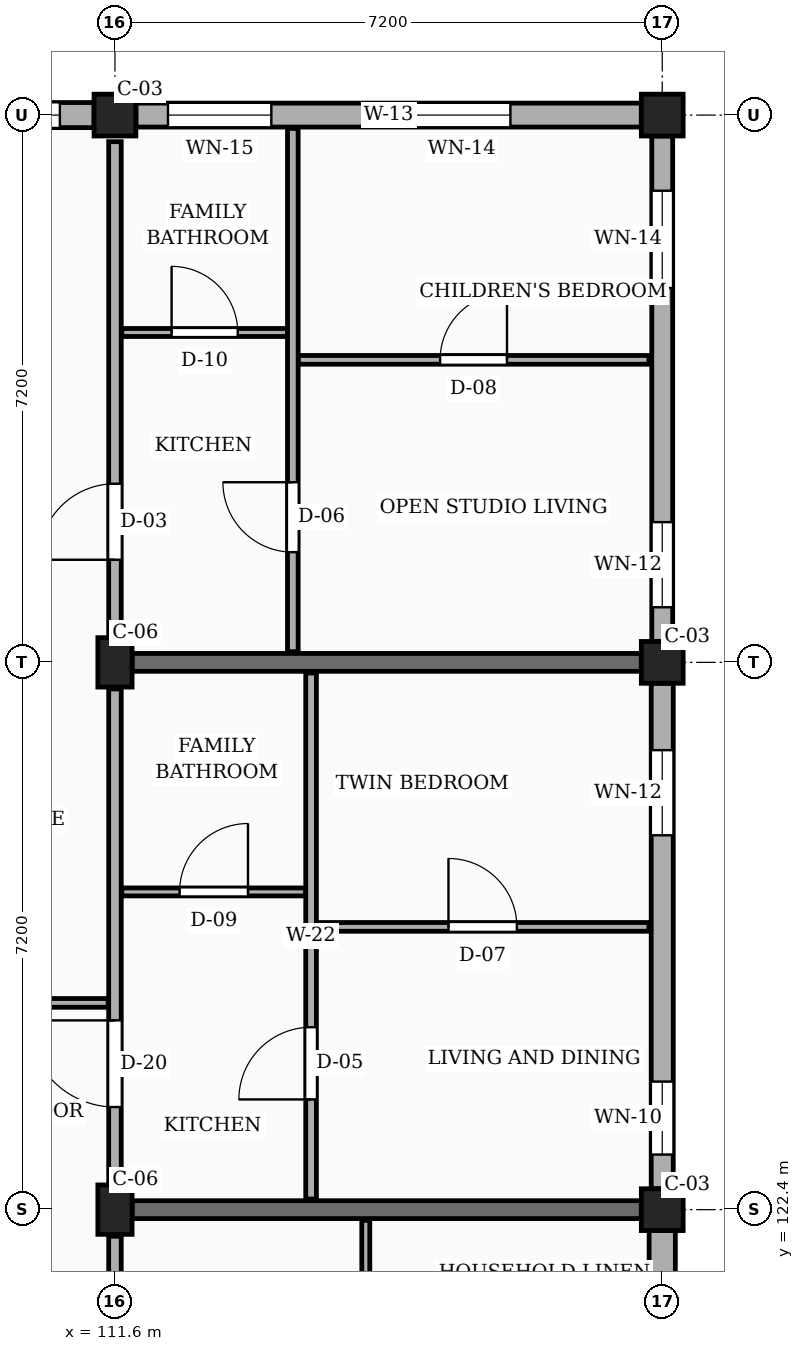
"""IFC4 building model, lengths in metres.
Left out: names, types, materials, properties, quantities, classifications, styles, units other than length and angle.
Written with IfcOpenShell. Run it as: python <this file> out.ifc"""

import sys

from ifc_helpers import new_model, si_unit, direction, frame, frame_2d, origin, origin_2d, place, context, subcontext, project, spatial, rectangle, extrude, element, fill, save


model = new_model("IFC4")
c1 = context("Model", 3, precision=1e-05, world=origin(), true_north=direction((0.0, 1.0)))
c2 = subcontext(c1, "Body", "Model", "MODEL_VIEW")
j1 = project(units=[si_unit("LENGTHUNIT", "METRE"), si_unit("PLANEANGLEUNIT", "RADIAN")], contexts=[c1])
p1 = place(None, origin())
s1 = spatial("IfcSite", under=j1, at=p1, CompositionType="ELEMENT")
p2 = place(p1, origin())
s2 = spatial("IfcBuilding", under=s1, at=p2, CompositionType="ELEMENT")
p3 = place(p2, frame((0.0, 0.0, 17.1)))
s3 = spatial("IfcBuildingStorey", under=s2, at=p3, CompositionType="ELEMENT", Elevation=17.1)
for number, where, z_axis, x_axis in (
    (1, (111.6, 122.4, 0.0), (0.0, 0.0, 1.0), (1.0, 0.0, 0.0)),
    (2, (111.6, 129.6, 0.0), (0.0, 0.0, 1.0), (1.0, 0.0, 0.0)),
):
    element("IfcColumn", number, at=place(p3, frame(where, z_axis=z_axis, x_axis=x_axis)), inside=s3, PredefinedType="COLUMN", context=c2, shape_type="SweptSolid", body=[
        extrude(rectangle(XDim=0.45, YDim=0.65, at=origin_2d()), origin(), (0.0, 0.0, 1.0), 3.15),
    ])
for number, where, z_axis, x_axis in (
    (3, (111.6, 136.8, 0.0), (0.0, 0.0, 1.0), (1.0, 0.0, 0.0)),
    (4, (118.8, 122.4, 0.0), (0.0, 0.0, 1.0), (1.0, 0.0, 0.0)),
    (5, (118.8, 129.6, 0.0), (0.0, 0.0, 1.0), (1.0, 0.0, 0.0)),
    (6, (118.8, 136.8, 0.0), (0.0, 0.0, 1.0), (1.0, 0.0, 0.0)),
):
    element("IfcColumn", number, at=place(p3, frame(where, z_axis=z_axis, x_axis=x_axis)), inside=s3, PredefinedType="COLUMN", context=c2, shape_type="SweptSolid", body=[
        extrude(rectangle(XDim=0.55, YDim=0.55, at=origin_2d()), origin(), (0.0, 0.0, 1.0), 3.15),
    ])
for number, where, z_axis, x_axis in (
    (7, (111.825, 122.4, 0.0), (0.0, 0.0, 1.0), (1.0, 0.0, 0.0)),
    (8, (111.825, 129.6, 0.0), (0.0, 0.0, 1.0), (1.0, 0.0, 0.0)),
):
    element("IfcWall", number, at=place(p3, frame(where, z_axis=z_axis, x_axis=x_axis)), inside=s3, PredefinedType="SOLIDWALL", context=c2, shape_type="SweptSolid", body=[
        extrude(rectangle(XDim=6.7, YDim=0.235, at=frame_2d((3.35, 0.0))), origin(), (0.0, 0.0, 1.0), 2.19),
    ])
p4 = place(p3, frame((118.8, 115.475, 0.0), z_axis=(0.0, 0.0, 1.0), x_axis=(0.0, 1.0, 0.0)))
e9 = element("IfcWall", 9, at=p4, inside=s3, PredefinedType="SOLIDWALL", context=c2, shape_type="SweptSolid", body=[
    extrude(rectangle(XDim=6.65, YDim=0.345, at=frame_2d((3.325, 0.0))), origin(), (0.0, 0.0, 1.0), 2.46),
])
p5 = place(p4, frame((0.45, 0.0, 0.78)))
e10 = element("IfcOpeningElement", 10, at=p5, cuts=e9, PredefinedType="OPENING", context=c2, shape_type="SweptSolid", body=[
    extrude(rectangle(XDim=1.4, YDim=1.15, at=frame_2d((0.7, 0.575))), frame((0.0, 0.183, 0.0), z_axis=(0.0, -1.0, 0.0), x_axis=(1.0, 0.0, 0.0)), (0.0, 0.0, 1.0), 0.365),
])
p6 = place(p4, frame((4.65, 0.0, 0.78)))
e11 = element("IfcOpeningElement", 11, at=p6, cuts=e9, PredefinedType="OPENING", context=c2, shape_type="SweptSolid", body=[
    extrude(rectangle(XDim=0.96, YDim=1.26, at=frame_2d((0.48, 0.63))), frame((0.0, 0.183, 0.0), z_axis=(0.0, -1.0, 0.0), x_axis=(1.0, 0.0, 0.0)), (0.0, 0.0, 1.0), 0.365),
])
p7 = place(p3, frame((118.8, 122.675, 0.0), z_axis=(0.0, 0.0, 1.0), x_axis=(0.0, 1.0, 0.0)))
e12 = element("IfcWall", 12, at=p7, inside=s3, PredefinedType="SOLIDWALL", context=c2, shape_type="SweptSolid", body=[
    extrude(rectangle(XDim=6.65, YDim=0.29, at=frame_2d((3.325, 0.0))), origin(), (0.0, 0.0, 1.0), 2.46),
])
p8 = place(p7, frame((0.45, 0.0, 0.78)))
e13 = element("IfcOpeningElement", 13, at=p8, cuts=e12, PredefinedType="OPENING", context=c2, shape_type="SweptSolid", body=[
    extrude(rectangle(XDim=0.96, YDim=1.26, at=frame_2d((0.48, 0.63))), frame((0.0, 0.155, 0.0), z_axis=(0.0, -1.0, 0.0), x_axis=(1.0, 0.0, 0.0)), (0.0, 0.0, 1.0), 0.31),
])
p9 = place(p7, frame((4.65, 0.0, 0.78)))
e14 = element("IfcOpeningElement", 14, at=p9, cuts=e12, PredefinedType="OPENING", context=c2, shape_type="SweptSolid", body=[
    extrude(rectangle(XDim=1.12, YDim=1.26, at=frame_2d((0.56, 0.63))), frame((0.0, 0.155, 0.0), z_axis=(0.0, -1.0, 0.0), x_axis=(1.0, 0.0, 0.0)), (0.0, 0.0, 1.0), 0.31),
])
p10 = place(p3, frame((118.8, 129.875, 0.0), z_axis=(0.0, 0.0, 1.0), x_axis=(0.0, 1.0, 0.0)))
e15 = element("IfcWall", 15, at=p10, inside=s3, PredefinedType="SOLIDWALL", context=c2, shape_type="SweptSolid", body=[
    extrude(rectangle(XDim=6.65, YDim=0.275, at=frame_2d((3.325, 0.0))), origin(), (0.0, 0.0, 1.0), 2.46),
])
p11 = place(p10, frame((0.45, 0.0, 0.78)))
e16 = element("IfcOpeningElement", 16, at=p11, cuts=e15, PredefinedType="OPENING", context=c2, shape_type="SweptSolid", body=[
    extrude(rectangle(XDim=1.12, YDim=1.26, at=frame_2d((0.56, 0.63))), frame((0.0, 0.147, 0.0), z_axis=(0.0, -1.0, 0.0), x_axis=(1.0, 0.0, 0.0)), (0.0, 0.0, 1.0), 0.295),
])
p12 = place(p10, frame((4.65, 0.0, 0.78)))
e17 = element("IfcOpeningElement", 17, at=p12, cuts=e15, PredefinedType="OPENING", context=c2, shape_type="SweptSolid", body=[
    extrude(rectangle(XDim=1.28, YDim=1.26, at=frame_2d((0.64, 0.63))), frame((0.0, 0.147, 0.0), z_axis=(0.0, -1.0, 0.0), x_axis=(1.0, 0.0, 0.0)), (0.0, 0.0, 1.0), 0.295),
])
p13 = place(p3, frame((118.525, 136.8, 0.0), z_axis=(0.0, 0.0, 1.0), x_axis=(-1.0, 0.0, 0.0)))
e18 = element("IfcWall", 18, at=p13, inside=s3, PredefinedType="SOLIDWALL", context=c2, shape_type="SweptSolid", body=[
    extrude(rectangle(XDim=6.65, YDim=0.315, at=frame_2d((3.325, 0.0))), origin(), (0.0, 0.0, 1.0), 2.46),
])
p14 = place(p13, frame((1.722, 0.0, 0.78)))
e19 = element("IfcOpeningElement", 19, at=p14, cuts=e18, PredefinedType="OPENING", context=c2, shape_type="SweptSolid", body=[
    extrude(rectangle(XDim=1.28, YDim=1.26, at=frame_2d((0.64, 0.63))), frame((0.0, 0.167, 0.0), z_axis=(0.0, -1.0, 0.0), x_axis=(1.0, 0.0, 0.0)), (0.0, 0.0, 1.0), 0.335),
])
p15 = place(p13, frame((4.867, 0.0, 0.78)))
e20 = element("IfcOpeningElement", 20, at=p15, cuts=e18, PredefinedType="OPENING", context=c2, shape_type="SweptSolid", body=[
    extrude(rectangle(XDim=1.36, YDim=1.26, at=frame_2d((0.68, 0.63))), frame((0.0, 0.167, 0.0), z_axis=(0.0, -1.0, 0.0), x_axis=(1.0, 0.0, 0.0)), (0.0, 0.0, 1.0), 0.335),
])
p16 = place(p3, frame((111.325, 136.8, 0.0), z_axis=(0.0, 0.0, 1.0), x_axis=(-1.0, 0.0, 0.0)))
e21 = element("IfcWall", 21, at=p16, inside=s3, PredefinedType="SOLIDWALL", context=c2, shape_type="SweptSolid", body=[
    extrude(rectangle(XDim=6.65, YDim=0.33, at=frame_2d((3.325, 0.0))), origin(), (0.0, 0.0, 1.0), 2.46),
])
p17 = place(p16, frame((0.45, 0.0, 0.78)))
e22 = element("IfcOpeningElement", 22, at=p17, cuts=e21, PredefinedType="OPENING", context=c2, shape_type="SweptSolid", body=[
    extrude(rectangle(XDim=1.44, YDim=1.26, at=frame_2d((0.72, 0.63))), frame((0.0, 0.175, 0.0), z_axis=(0.0, -1.0, 0.0), x_axis=(1.0, 0.0, 0.0)), (0.0, 0.0, 1.0), 0.35),
])
p18 = place(p16, frame((4.65, 0.0, 0.78)))
e23 = element("IfcOpeningElement", 23, at=p18, cuts=e21, PredefinedType="OPENING", context=c2, shape_type="SweptSolid", body=[
    extrude(rectangle(XDim=0.98, YDim=1.36, at=frame_2d((0.49, 0.68))), frame((0.0, 0.175, 0.0), z_axis=(0.0, -1.0, 0.0), x_axis=(1.0, 0.0, 0.0)), (0.0, 0.0, 1.0), 0.35),
])
p19 = place(p3, frame((111.6, 115.55, 0.0), z_axis=(0.0, 0.0, 1.0), x_axis=(0.0, 1.0, 0.0)))
e24 = element("IfcWall", 24, at=p19, inside=s3, PredefinedType="PARTITIONING", context=c2, shape_type="SweptSolid", body=[
    extrude(rectangle(XDim=6.5, YDim=0.165, at=frame_2d((3.25, 0.0))), origin(), (0.0, 0.0, 1.0), 2.325),
])
p20 = place(p19, frame((1.1, 0.0, 0.0)))
e25 = element("IfcOpeningElement", 25, at=p20, cuts=e24, PredefinedType="OPENING", context=c2, shape_type="SweptSolid", body=[
    extrude(rectangle(XDim=0.94, YDim=2.12, at=frame_2d((0.47, 1.06))), frame((0.0, 0.093, 0.0), z_axis=(0.0, -1.0, 0.0), x_axis=(1.0, 0.0, 0.0)), (0.0, 0.0, 1.0), 0.185),
])
p21 = place(p3, frame((111.6, 122.75, 0.0), z_axis=(0.0, 0.0, 1.0), x_axis=(0.0, 1.0, 0.0)))
e26 = element("IfcWall", 26, at=p21, inside=s3, PredefinedType="PARTITIONING", context=c2, shape_type="SweptSolid", body=[
    extrude(rectangle(XDim=6.5, YDim=0.165, at=frame_2d((3.25, 0.0))), origin(), (0.0, 0.0, 1.0), 2.325),
])
p22 = place(p21, frame((1.0, 0.0, 0.0)))
e27 = element("IfcOpeningElement", 27, at=p22, cuts=e26, PredefinedType="OPENING", context=c2, shape_type="SweptSolid", body=[
    extrude(rectangle(XDim=1.14, YDim=2.18, at=frame_2d((0.57, 1.09))), frame((0.0, 0.093, 0.0), z_axis=(0.0, -1.0, 0.0), x_axis=(1.0, 0.0, 0.0)), (0.0, 0.0, 1.0), 0.185),
])
p23 = place(p3, frame((111.6, 129.95, 0.0), z_axis=(0.0, 0.0, 1.0), x_axis=(0.0, 1.0, 0.0)))
e28 = element("IfcWall", 28, at=p23, inside=s3, PredefinedType="PARTITIONING", context=c2, shape_type="SweptSolid", body=[
    extrude(rectangle(XDim=6.5, YDim=0.165, at=frame_2d((3.25, 0.0))), origin(), (0.0, 0.0, 1.0), 2.325),
])
p24 = place(p23, frame((1.0, 0.0, 0.0)))
e29 = element("IfcOpeningElement", 29, at=p24, cuts=e28, PredefinedType="OPENING", context=c2, shape_type="SweptSolid", body=[
    extrude(rectangle(XDim=1.0, YDim=2.15, at=frame_2d((0.5, 1.075))), frame((0.0, 0.093, 0.0), z_axis=(0.0, -1.0, 0.0), x_axis=(1.0, 0.0, 0.0)), (0.0, 0.0, 1.0), 0.185),
])
p25 = place(p3, frame((114.9, 119.07, 0.0), z_axis=(0.0, 0.0, 1.0), x_axis=(0.0, 1.0, 0.0)))
e30 = element("IfcWall", 30, at=p25, inside=s3, PredefinedType="PARTITIONING", context=c2, shape_type="SweptSolid", body=[
    extrude(rectangle(XDim=3.19, YDim=0.105, at=frame_2d((1.595, 0.0))), origin(), (0.0, 0.0, 1.0), 2.325),
])
p26 = place(p3, frame((104.49, 125.12, 0.0), z_axis=(0.0, 0.0, 1.0), x_axis=(1.0, 0.0, 0.0)))
e31 = element("IfcWall", 31, at=p26, inside=s3, PredefinedType="PARTITIONING", context=c2, shape_type="SweptSolid", body=[
    extrude(rectangle(XDim=7.02, YDim=0.115, at=frame_2d((3.51, 0.0))), origin(), (0.0, 0.0, 1.0), 2.325),
])
p27 = place(p26, frame((2.85, 0.0, 0.0)))
e32 = element("IfcOpeningElement", 32, at=p27, cuts=e31, PredefinedType="OPENING", context=c2, shape_type="SweptSolid", body=[
    extrude(rectangle(XDim=1.02, YDim=2.15, at=frame_2d((0.51, 1.075))), frame((0.0, 0.067, 0.0), z_axis=(0.0, -1.0, 0.0), x_axis=(1.0, 0.0, 0.0)), (0.0, 0.0, 1.0), 0.135),
])
p28 = place(p3, frame((114.25, 126.12, 0.0), z_axis=(0.0, 0.0, 1.0), x_axis=(1.0, 0.0, 0.0)))
e33 = element("IfcWall", 33, at=p28, inside=s3, PredefinedType="PARTITIONING", context=c2, shape_type="SweptSolid", body=[
    extrude(rectangle(XDim=4.375, YDim=0.115, at=frame_2d((2.188, 0.0))), origin(), (0.0, 0.0, 1.0), 2.325),
])
p29 = place(p28, frame((1.738, 0.0, 0.0)))
e34 = element("IfcOpeningElement", 34, at=p29, cuts=e33, PredefinedType="OPENING", context=c2, shape_type="SweptSolid", body=[
    extrude(rectangle(XDim=0.9, YDim=2.1, at=frame_2d((0.45, 1.05))), frame((0.0, 0.067, 0.0), z_axis=(0.0, -1.0, 0.0), x_axis=(1.0, 0.0, 0.0)), (0.0, 0.0, 1.0), 0.135),
])
p30 = place(p3, frame((111.69, 126.58, 0.0), z_axis=(0.0, 0.0, 1.0), x_axis=(1.0, 0.0, 0.0)))
e35 = element("IfcWall", 35, at=p30, inside=s3, PredefinedType="PARTITIONING", context=c2, shape_type="SweptSolid", body=[
    extrude(rectangle(XDim=2.42, YDim=0.105, at=frame_2d((1.21, 0.0))), origin(), (0.0, 0.0, 1.0), 2.325),
])
p31 = place(p30, frame((0.76, 0.0, 0.0)))
e36 = element("IfcOpeningElement", 36, at=p31, cuts=e35, PredefinedType="OPENING", context=c2, shape_type="SweptSolid", body=[
    extrude(rectangle(XDim=0.9, YDim=2.05, at=frame_2d((0.45, 1.025))), frame((0.0, 0.062, 0.0), z_axis=(0.0, -1.0, 0.0), x_axis=(1.0, 0.0, 0.0)), (0.0, 0.0, 1.0), 0.125),
])
p32 = place(p3, frame((114.18, 122.54, 0.0), z_axis=(0.0, 0.0, 1.0), x_axis=(0.0, 1.0, 0.0)))
e37 = element("IfcWall", 37, at=p32, inside=s3, PredefinedType="PARTITIONING", context=c2, shape_type="SweptSolid", body=[
    extrude(rectangle(XDim=6.92, YDim=0.14, at=frame_2d((3.46, 0.0))), origin(), (0.0, 0.0, 1.0), 2.325),
])
p33 = place(p32, frame((1.31, 0.0, 0.0)))
e38 = element("IfcOpeningElement", 38, at=p33, cuts=e37, PredefinedType="OPENING", context=c2, shape_type="SweptSolid", body=[
    extrude(rectangle(XDim=0.95, YDim=2.1, at=frame_2d((0.475, 1.05))), frame((0.0, 0.08, 0.0), z_axis=(0.0, -1.0, 0.0), x_axis=(1.0, 0.0, 0.0)), (0.0, 0.0, 1.0), 0.16),
])
p34 = place(p3, frame((114.01, 133.58, 0.0), z_axis=(0.0, 0.0, 1.0), x_axis=(1.0, 0.0, 0.0)))
e39 = element("IfcWall", 39, at=p34, inside=s3, PredefinedType="PARTITIONING", context=c2, shape_type="SweptSolid", body=[
    extrude(rectangle(XDim=4.615, YDim=0.115, at=frame_2d((2.308, 0.0))), origin(), (0.0, 0.0, 1.0), 2.325),
])
p35 = place(p34, frame((1.867, 0.0, 0.0)))
e40 = element("IfcOpeningElement", 40, at=p35, cuts=e39, PredefinedType="OPENING", context=c2, shape_type="SweptSolid", body=[
    extrude(rectangle(XDim=0.88, YDim=2.08, at=frame_2d((0.44, 1.04))), frame((0.0, 0.067, 0.0), z_axis=(0.0, -1.0, 0.0), x_axis=(1.0, 0.0, 0.0)), (0.0, 0.0, 1.0), 0.135),
])
p36 = place(p3, frame((111.69, 133.94, 0.0), z_axis=(0.0, 0.0, 1.0), x_axis=(1.0, 0.0, 0.0)))
e41 = element("IfcWall", 41, at=p36, inside=s3, PredefinedType="PARTITIONING", context=c2, shape_type="SweptSolid", body=[
    extrude(rectangle(XDim=2.18, YDim=0.105, at=frame_2d((1.09, 0.0))), origin(), (0.0, 0.0, 1.0), 2.325),
])
p37 = place(p36, frame((0.655, 0.0, 0.0)))
e42 = element("IfcOpeningElement", 42, at=p37, cuts=e41, PredefinedType="OPENING", context=c2, shape_type="SweptSolid", body=[
    extrude(rectangle(XDim=0.87, YDim=2.05, at=frame_2d((0.435, 1.025))), frame((0.0, 0.062, 0.0), z_axis=(0.0, -1.0, 0.0), x_axis=(1.0, 0.0, 0.0)), (0.0, 0.0, 1.0), 0.125),
])
p38 = place(p3, frame((113.94, 129.74, 0.0), z_axis=(0.0, 0.0, 1.0), x_axis=(0.0, 1.0, 0.0)))
e43 = element("IfcWall", 43, at=p38, inside=s3, PredefinedType="PARTITIONING", context=c2, shape_type="SweptSolid", body=[
    extrude(rectangle(XDim=6.885, YDim=0.14, at=frame_2d((3.442, 0.0))), origin(), (0.0, 0.0, 1.0), 2.325),
])
p39 = place(p38, frame((1.31, 0.0, 0.0)))
e44 = element("IfcOpeningElement", 44, at=p39, cuts=e43, PredefinedType="OPENING", context=c2, shape_type="SweptSolid", body=[
    extrude(rectangle(XDim=0.92, YDim=2.1, at=frame_2d((0.46, 1.05))), frame((0.0, 0.08, 0.0), z_axis=(0.0, -1.0, 0.0), x_axis=(1.0, 0.0, 0.0)), (0.0, 0.0, 1.0), 0.16),
])
p40 = place(p8, origin())
e45 = element("IfcWindow", 45, at=p40, inside=s3, PartitioningType="SINGLE_PANEL", PredefinedType="WINDOW", context=c2, shape_type="SweptSolid", body=[
    extrude(rectangle(XDim=0.96, YDim=1.26, at=frame_2d((0.48, 0.63))), frame((0.0, 0.03, 0.0), z_axis=(0.0, -1.0, 0.0), x_axis=(1.0, 0.0, 0.0)), (0.0, 0.0, 1.0), 0.06),
])
fill(e13, e45)
p41 = place(p9, origin())
e46 = element("IfcWindow", 46, at=p41, inside=s3, PartitioningType="SINGLE_PANEL", PredefinedType="WINDOW", context=c2, shape_type="SweptSolid", body=[
    extrude(rectangle(XDim=1.12, YDim=1.26, at=frame_2d((0.56, 0.63))), frame((0.0, 0.03, 0.0), z_axis=(0.0, -1.0, 0.0), x_axis=(1.0, 0.0, 0.0)), (0.0, 0.0, 1.0), 0.06),
])
fill(e14, e46)
p42 = place(p11, origin())
e47 = element("IfcWindow", 47, at=p42, inside=s3, PartitioningType="SINGLE_PANEL", PredefinedType="WINDOW", context=c2, shape_type="SweptSolid", body=[
    extrude(rectangle(XDim=1.12, YDim=1.26, at=frame_2d((0.56, 0.63))), frame((0.0, 0.03, 0.0), z_axis=(0.0, -1.0, 0.0), x_axis=(1.0, 0.0, 0.0)), (0.0, 0.0, 1.0), 0.06),
])
fill(e16, e47)
p43 = place(p12, origin())
e48 = element("IfcWindow", 48, at=p43, inside=s3, PartitioningType="SINGLE_PANEL", PredefinedType="WINDOW", context=c2, shape_type="SweptSolid", body=[
    extrude(rectangle(XDim=1.28, YDim=1.26, at=frame_2d((0.64, 0.63))), frame((0.0, 0.03, 0.0), z_axis=(0.0, -1.0, 0.0), x_axis=(1.0, 0.0, 0.0)), (0.0, 0.0, 1.0), 0.06),
])
fill(e17, e48)
p44 = place(p14, origin())
e49 = element("IfcWindow", 49, at=p44, inside=s3, PartitioningType="SINGLE_PANEL", PredefinedType="WINDOW", context=c2, shape_type="SweptSolid", body=[
    extrude(rectangle(XDim=1.28, YDim=1.26, at=frame_2d((0.64, 0.63))), frame((0.0, 0.03, 0.0), z_axis=(0.0, -1.0, 0.0), x_axis=(1.0, 0.0, 0.0)), (0.0, 0.0, 1.0), 0.06),
])
fill(e19, e49)
p45 = place(p15, origin())
e50 = element("IfcWindow", 50, at=p45, inside=s3, PartitioningType="SINGLE_PANEL", PredefinedType="WINDOW", context=c2, shape_type="SweptSolid", body=[
    extrude(rectangle(XDim=1.36, YDim=1.26, at=frame_2d((0.68, 0.63))), frame((0.0, 0.03, 0.0), z_axis=(0.0, -1.0, 0.0), x_axis=(1.0, 0.0, 0.0)), (0.0, 0.0, 1.0), 0.06),
])
fill(e20, e50)
p46 = place(p17, origin())
e51 = element("IfcWindow", 51, at=p46, inside=s3, PartitioningType="SINGLE_PANEL", PredefinedType="WINDOW", context=c2, shape_type="SweptSolid", body=[
    extrude(rectangle(XDim=1.44, YDim=1.26, at=frame_2d((0.72, 0.63))), frame((0.0, 0.03, 0.0), z_axis=(0.0, -1.0, 0.0), x_axis=(1.0, 0.0, 0.0)), (0.0, 0.0, 1.0), 0.06),
])
fill(e22, e51)
p47 = place(p22, origin())
e52 = element("IfcDoor", 52, at=p47, inside=s3, OperationType="SINGLE_SWING_RIGHT", PredefinedType="DOOR", context=c2, shape_type="SweptSolid", body=[
    extrude(rectangle(XDim=1.14, YDim=2.18, at=frame_2d((0.57, 1.09))), frame((0.0, 0.025, 0.0), z_axis=(0.0, -1.0, 0.0), x_axis=(1.0, 0.0, 0.0)), (0.0, 0.0, 1.0), 0.05),
])
fill(e27, e52)
p48 = place(p24, origin())
e53 = element("IfcDoor", 53, at=p48, inside=s3, OperationType="SINGLE_SWING_LEFT", PredefinedType="DOOR", context=c2, shape_type="SweptSolid", body=[
    extrude(rectangle(XDim=1.0, YDim=2.15, at=frame_2d((0.5, 1.075))), frame((0.0, 0.025, 0.0), z_axis=(0.0, -1.0, 0.0), x_axis=(1.0, 0.0, 0.0)), (0.0, 0.0, 1.0), 0.05),
])
fill(e29, e53)
p49 = place(p29, origin())
e54 = element("IfcDoor", 54, at=p49, inside=s3, OperationType="SINGLE_SWING_LEFT", PredefinedType="DOOR", context=c2, shape_type="SweptSolid", body=[
    extrude(rectangle(XDim=0.9, YDim=2.1, at=frame_2d((0.45, 1.05))), frame((0.0, 0.025, 0.0), z_axis=(0.0, -1.0, 0.0), x_axis=(1.0, 0.0, 0.0)), (0.0, 0.0, 1.0), 0.05),
])
fill(e34, e54)
p50 = place(p31, origin())
e55 = element("IfcDoor", 55, at=p50, inside=s3, OperationType="SINGLE_SWING_RIGHT", PredefinedType="DOOR", context=c2, shape_type="SweptSolid", body=[
    extrude(rectangle(XDim=0.9, YDim=2.05, at=frame_2d((0.45, 1.025))), frame((0.0, 0.025, 0.0), z_axis=(0.0, -1.0, 0.0), x_axis=(1.0, 0.0, 0.0)), (0.0, 0.0, 1.0), 0.05),
])
fill(e36, e55)
p51 = place(p33, origin())
e56 = element("IfcDoor", 56, at=p51, inside=s3, OperationType="SINGLE_SWING_LEFT", PredefinedType="DOOR", context=c2, shape_type="SweptSolid", body=[
    extrude(rectangle(XDim=0.95, YDim=2.1, at=frame_2d((0.475, 1.05))), frame((0.0, 0.025, 0.0), z_axis=(0.0, -1.0, 0.0), x_axis=(1.0, 0.0, 0.0)), (0.0, 0.0, 1.0), 0.05),
])
fill(e38, e56)
p52 = place(p35, origin())
e57 = element("IfcDoor", 57, at=p52, inside=s3, OperationType="SINGLE_SWING_RIGHT", PredefinedType="DOOR", context=c2, shape_type="SweptSolid", body=[
    extrude(rectangle(XDim=0.88, YDim=2.08, at=frame_2d((0.44, 1.04))), frame((0.0, 0.025, 0.0), z_axis=(0.0, -1.0, 0.0), x_axis=(1.0, 0.0, 0.0)), (0.0, 0.0, 1.0), 0.05),
])
fill(e40, e57)
p53 = place(p37, origin())
e58 = element("IfcDoor", 58, at=p53, inside=s3, OperationType="SINGLE_SWING_LEFT", PredefinedType="DOOR", context=c2, shape_type="SweptSolid", body=[
    extrude(rectangle(XDim=0.87, YDim=2.05, at=frame_2d((0.435, 1.025))), frame((0.0, 0.025, 0.0), z_axis=(0.0, -1.0, 0.0), x_axis=(1.0, 0.0, 0.0)), (0.0, 0.0, 1.0), 0.05),
])
fill(e42, e58)
p54 = place(p39, origin())
e59 = element("IfcDoor", 59, at=p54, inside=s3, OperationType="SINGLE_SWING_RIGHT", PredefinedType="DOOR", context=c2, shape_type="SweptSolid", body=[
    extrude(rectangle(XDim=0.92, YDim=2.1, at=frame_2d((0.46, 1.05))), frame((0.0, 0.025, 0.0), z_axis=(0.0, -1.0, 0.0), x_axis=(1.0, 0.0, 0.0)), (0.0, 0.0, 1.0), 0.05),
])
fill(e44, e59)
save(model, sys.argv[1])
